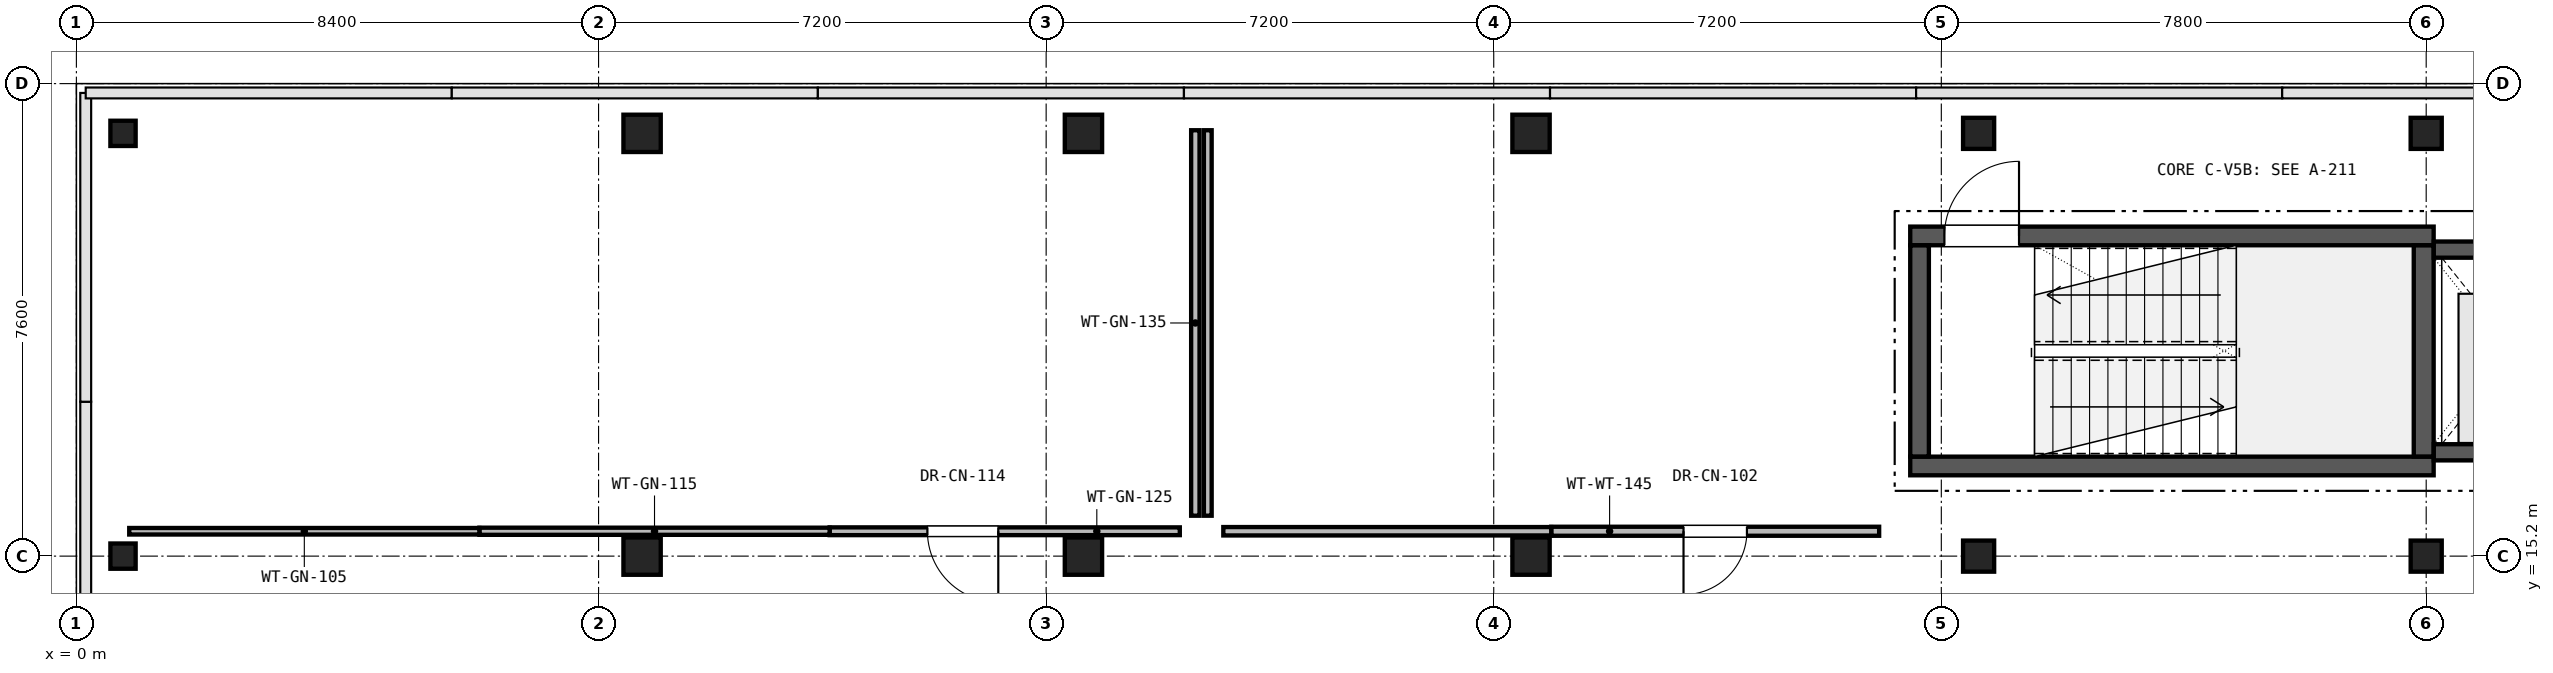
"""IFC4 building model, lengths in metres.
Left out: names, types, materials, properties, quantities, classifications, styles, units other than length and angle.
Written with IfcOpenShell. Run it as: python <this file> out.ifc"""

import sys

from ifc_helpers import new_model, si_unit, direction, frame, frame_2d, origin, origin_2d, place, context, subcontext, project, spatial, rectangle, hollow_circle, extrude, element, fill, save


model = new_model("IFC4")
c1 = context("Model", 3, precision=1e-05, world=origin(), true_north=direction((0.0, 1.0)))
c2 = subcontext(c1, "Body", "Model", "MODEL_VIEW")
j1 = project(units=[si_unit("LENGTHUNIT", "METRE"), si_unit("PLANEANGLEUNIT", "RADIAN")], contexts=[c1])
p1 = place(None, origin())
s1 = spatial("IfcSite", under=j1, at=p1, CompositionType="ELEMENT")
p2 = place(p1, origin())
s2 = spatial("IfcBuilding", under=s1, at=p2, CompositionType="ELEMENT")
p3 = place(p2, frame((0.0, 0.0, 13.6)))
s3 = spatial("IfcBuildingStorey", under=s2, at=p3, CompositionType="ELEMENT", Elevation=13.6)
for number, where, z_axis, x_axis in (
    (1, (0.75, 15.2, 0.0), (0.0, 0.0, 1.0), (1.0, 0.0, 0.0)),
    (2, (0.75, 22.0, 0.0), (0.0, 0.0, 1.0), (1.0, 0.0, 0.0)),
):
    element("IfcColumn", number, at=place(p3, frame(where, z_axis=z_axis, x_axis=x_axis)), inside=s3, PredefinedType="COLUMN", context=c2, shape_type="SweptSolid", body=[
        extrude(hollow_circle(Radius=0.203, WallThickness=0.016, at=origin_2d()), origin(), (0.0, 0.0, 1.0), 4.08),
    ])
for number, where, z_axis, x_axis in (
    (3, (9.1, 15.2, 0.0), (0.0, 0.0, 1.0), (1.0, 0.0, 0.0)),
    (4, (9.1, 22.0, 0.0), (0.0, 0.0, 1.0), (1.0, 0.0, 0.0)),
    (5, (16.2, 15.2, 0.0), (0.0, 0.0, 1.0), (1.0, 0.0, 0.0)),
    (6, (16.2, 22.0, 0.0), (0.0, 0.0, 1.0), (1.0, 0.0, 0.0)),
    (7, (23.4, 15.2, 0.0), (0.0, 0.0, 1.0), (1.0, 0.0, 0.0)),
    (8, (23.4, 22.0, 0.0), (0.0, 0.0, 1.0), (1.0, 0.0, 0.0)),
):
    element("IfcColumn", number, at=place(p3, frame(where, z_axis=z_axis, x_axis=x_axis)), inside=s3, PredefinedType="COLUMN", context=c2, shape_type="SweptSolid", body=[
        extrude(rectangle(XDim=0.6, YDim=0.6, at=origin_2d()), origin(), (0.0, 0.0, 1.0), 4.08),
    ])
for number, where, z_axis, x_axis in (
    (9, (30.6, 15.2, 0.0), (0.0, 0.0, 1.0), (1.0, 0.0, 0.0)),
    (10, (30.6, 22.0, 0.0), (0.0, 0.0, 1.0), (1.0, 0.0, 0.0)),
    (11, (37.8, 15.2, 0.0), (0.0, 0.0, 1.0), (1.0, 0.0, 0.0)),
    (12, (37.8, 22.0, 0.0), (0.0, 0.0, 1.0), (1.0, 0.0, 0.0)),
):
    element("IfcColumn", number, at=place(p3, frame(where, z_axis=z_axis, x_axis=x_axis)), inside=s3, PredefinedType="COLUMN", context=c2, shape_type="SweptSolid", body=[
        extrude(rectangle(XDim=0.5, YDim=0.5, at=origin_2d()), origin(), (0.0, 0.0, 1.0), 4.08),
    ])
p4 = place(p3, frame((29.5, 16.65, 0.0), z_axis=(0.0, 0.0, 1.0), x_axis=(1.0, 0.0, 0.0)))
e13 = element("IfcWall", 13, at=p4, inside=s3, PredefinedType="SHEAR", context=c2, shape_type="SweptSolid", body=[
    extrude(rectangle(XDim=8.42, YDim=0.3, at=frame_2d((4.21, 0.0))), origin(), (0.0, 0.0, 1.0), 3.72),
])
p5 = place(p3, frame((29.5, 20.35, 0.0), z_axis=(0.0, 0.0, 1.0), x_axis=(1.0, 0.0, 0.0)))
e14 = element("IfcWall", 14, at=p5, inside=s3, PredefinedType="SHEAR", context=c2, shape_type="SweptSolid", body=[
    extrude(rectangle(XDim=8.42, YDim=0.3, at=frame_2d((4.21, 0.0))), origin(), (0.0, 0.0, 1.0), 3.72),
])
p6 = place(p5, frame((0.55, 0.0, 0.0)))
e15 = element("IfcOpeningElement", 15, at=p6, cuts=e14, PredefinedType="OPENING", context=c2, shape_type="SweptSolid", body=[
    extrude(rectangle(XDim=1.2, YDim=2.2, at=frame_2d((0.6, 1.1))), frame((0.0, 0.16, 0.0), z_axis=(0.0, -1.0, 0.0), x_axis=(1.0, 0.0, 0.0)), (0.0, 0.0, 1.0), 0.32),
])
p7 = place(p3, frame((29.65, 16.802, 0.0), z_axis=(0.0, 0.0, 1.0), x_axis=(0.0, 1.0, 0.0)))
e16 = element("IfcWall", 16, at=p7, inside=s3, PredefinedType="SHEAR", context=c2, shape_type="SweptSolid", body=[
    extrude(rectangle(XDim=3.396, YDim=0.3, at=frame_2d((1.698, 0.0))), origin(), (0.0, 0.0, 1.0), 3.72),
])
p8 = place(p3, frame((37.76, 16.802, 0.0), z_axis=(0.0, 0.0, 1.0), x_axis=(0.0, 1.0, 0.0)))
e17 = element("IfcWall", 17, at=p8, inside=s3, PredefinedType="SHEAR", context=c2, shape_type="SweptSolid", body=[
    extrude(rectangle(XDim=3.396, YDim=0.32, at=frame_2d((1.698, 0.0))), origin(), (0.0, 0.0, 1.0), 3.72),
])
p9 = place(p3, frame((37.922, 16.87, 0.0), z_axis=(0.0, 0.0, 1.0), x_axis=(1.0, 0.0, 0.0)))
e18 = element("IfcWall", 18, at=p9, inside=s3, PredefinedType="SHEAR", context=c2, shape_type="SweptSolid", body=[
    extrude(rectangle(XDim=2.658, YDim=0.26, at=frame_2d((1.329, 0.0))), origin(), (0.0, 0.0, 1.0), 3.72),
])
p10 = place(p3, frame((37.922, 20.13, 0.0), z_axis=(0.0, 0.0, 1.0), x_axis=(1.0, 0.0, 0.0)))
e19 = element("IfcWall", 19, at=p10, inside=s3, PredefinedType="SHEAR", context=c2, shape_type="SweptSolid", body=[
    extrude(rectangle(XDim=2.658, YDim=0.26, at=frame_2d((1.329, 0.0))), origin(), (0.0, 0.0, 1.0), 3.72),
])
p11 = place(p10, frame((0.679, 0.0, 0.0)))
e20 = element("IfcOpeningElement", 20, at=p11, cuts=e19, PredefinedType="OPENING", context=c2, shape_type="SweptSolid", body=[
    extrude(rectangle(XDim=1.3, YDim=2.2, at=frame_2d((0.65, 1.1))), frame((0.0, 0.14, 0.0), z_axis=(0.0, -1.0, 0.0), x_axis=(1.0, 0.0, 0.0)), (0.0, 0.0, 1.0), 0.28),
])
p12 = place(p3, frame((18.0, 22.05, 0.0), z_axis=(0.0, 0.0, 1.0), x_axis=(0.0, -1.0, 0.0)))
e21 = element("IfcWall", 21, at=p12, inside=s3, PredefinedType="PARTITIONING", context=c2, shape_type="SweptSolid", body=[
    extrude(rectangle(XDim=6.2, YDim=0.135, at=frame_2d((3.1, 0.0))), origin(), (0.0, 0.0, 1.0), 2.77),
])
p13 = place(p3, frame((17.75, 15.6, 0.0), z_axis=(0.0, 0.0, 1.0), x_axis=(-1.0, 0.0, 0.0)))
e22 = element("IfcWall", 22, at=p13, inside=s3, PredefinedType="PARTITIONING", context=c2, shape_type="SweptSolid", body=[
    extrude(rectangle(XDim=5.633, YDim=0.125, at=frame_2d((2.816, 0.0))), origin(), (0.0, 0.0, 1.0), 2.77),
])
p14 = place(p13, frame((2.92, 0.0, 0.0)))
e23 = element("IfcOpeningElement", 23, at=p14, cuts=e22, PredefinedType="OPENING", context=c2, shape_type="SweptSolid", body=[
    extrude(rectangle(XDim=1.14, YDim=2.2, at=frame_2d((0.57, 1.1))), frame((0.0, 0.073, 0.0), z_axis=(0.0, -1.0, 0.0), x_axis=(1.0, 0.0, 0.0)), (0.0, 0.0, 1.0), 0.145),
])
p15 = place(p3, frame((12.117, 15.6, 0.0), z_axis=(0.0, 0.0, 1.0), x_axis=(-1.0, 0.0, 0.0)))
e24 = element("IfcWall", 24, at=p15, inside=s3, PredefinedType="PARTITIONING", context=c2, shape_type="SweptSolid", body=[
    extrude(rectangle(XDim=5.634, YDim=0.115, at=frame_2d((2.817, 0.0))), origin(), (0.0, 0.0, 1.0), 2.77),
])
p16 = place(p3, frame((6.483, 15.6, 0.0), z_axis=(0.0, 0.0, 1.0), x_axis=(-1.0, 0.0, 0.0)))
e25 = element("IfcWall", 25, at=p16, inside=s3, PredefinedType="PARTITIONING", context=c2, shape_type="SweptSolid", body=[
    extrude(rectangle(XDim=5.633, YDim=0.105, at=frame_2d((2.816, 0.0))), origin(), (0.0, 0.0, 1.0), 2.77),
])
p17 = place(p3, frame((29.0, 15.6, 0.0), z_axis=(0.0, 0.0, 1.0), x_axis=(-1.0, 0.0, 0.0)))
e26 = element("IfcWall", 26, at=p17, inside=s3, PredefinedType="PARTITIONING", context=c2, shape_type="SweptSolid", body=[
    extrude(rectangle(XDim=5.275, YDim=0.145, at=frame_2d((2.637, 0.0))), origin(), (0.0, 0.0, 1.0), 2.77),
])
p18 = place(p17, frame((2.127, 0.0, 0.0)))
e27 = element("IfcOpeningElement", 27, at=p18, cuts=e26, PredefinedType="OPENING", context=c2, shape_type="SweptSolid", body=[
    extrude(rectangle(XDim=1.02, YDim=2.15, at=frame_2d((0.51, 1.075))), frame((0.0, 0.083, 0.0), z_axis=(0.0, -1.0, 0.0), x_axis=(1.0, 0.0, 0.0)), (0.0, 0.0, 1.0), 0.165),
])
p19 = place(p3, frame((23.725, 15.6, 0.0), z_axis=(0.0, 0.0, 1.0), x_axis=(-1.0, 0.0, 0.0)))
e28 = element("IfcWall", 28, at=p19, inside=s3, PredefinedType="PARTITIONING", context=c2, shape_type="SweptSolid", body=[
    extrude(rectangle(XDim=5.275, YDim=0.135, at=frame_2d((2.638, 0.0))), origin(), (0.0, 0.0, 1.0), 2.77),
])
p20 = place(p3, frame((18.2, 15.85, 0.0), z_axis=(0.0, 0.0, 1.0), x_axis=(0.0, 1.0, 0.0)))
e29 = element("IfcWall", 29, at=p20, inside=s3, PredefinedType="PARTITIONING", context=c2, shape_type="SweptSolid", body=[
    extrude(rectangle(XDim=6.2, YDim=0.125, at=frame_2d((3.1, 0.0))), origin(), (0.0, 0.0, 1.0), 2.77),
])
p21 = place(p6, origin())
e30 = element("IfcDoor", 30, at=p21, inside=s3, OperationType="SINGLE_SWING_RIGHT", PredefinedType="DOOR", context=c2, shape_type="SweptSolid", body=[
    extrude(rectangle(XDim=1.2, YDim=2.2, at=frame_2d((0.6, 1.1))), frame((0.0, 0.025, 0.0), z_axis=(0.0, -1.0, 0.0), x_axis=(1.0, 0.0, 0.0)), (0.0, 0.0, 1.0), 0.05),
])
fill(e15, e30)
p22 = place(p14, origin())
e31 = element("IfcDoor", 31, at=p22, inside=s3, OperationType="SINGLE_SWING_LEFT", PredefinedType="DOOR", context=c2, shape_type="SweptSolid", body=[
    extrude(rectangle(XDim=1.14, YDim=2.2, at=frame_2d((0.57, 1.1))), frame((0.0, 0.025, 0.0), z_axis=(0.0, -1.0, 0.0), x_axis=(1.0, 0.0, 0.0)), (0.0, 0.0, 1.0), 0.05),
])
fill(e23, e31)
p23 = place(p18, origin())
e32 = element("IfcDoor", 32, at=p23, inside=s3, OperationType="SINGLE_SWING_RIGHT", PredefinedType="DOOR", context=c2, shape_type="SweptSolid", body=[
    extrude(rectangle(XDim=1.02, YDim=2.15, at=frame_2d((0.51, 1.075))), frame((0.0, 0.025, 0.0), z_axis=(0.0, -1.0, 0.0), x_axis=(1.0, 0.0, 0.0)), (0.0, 0.0, 1.0), 0.05),
])
fill(e27, e32)
save(model, sys.argv[1])
